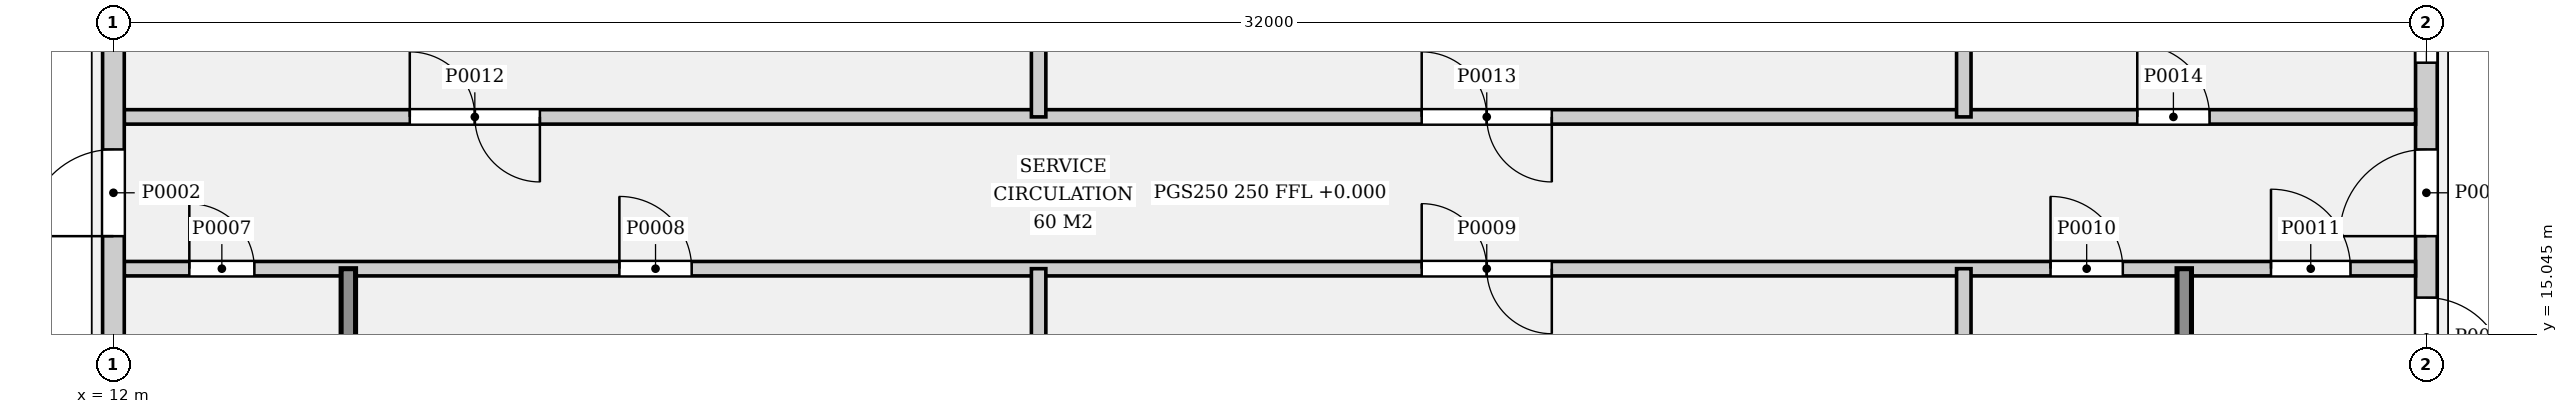
"""IFC4 building model, lengths in metres.
Left out: names, types, materials, properties, quantities, classifications, styles, units other than length and angle.
Written with IfcOpenShell. Run it as: python <this file> out.ifc"""

import sys

from ifc_helpers import new_model, si_unit, direction, frame, frame_2d, origin, place, context, subcontext, project, spatial, rectangle, extrude, element, fill, save


model = new_model("IFC4")
c1 = context("Model", 3, precision=1e-05, world=origin(), true_north=direction((0.0, 1.0)))
c2 = subcontext(c1, "Body", "Model", "MODEL_VIEW")
j1 = project(units=[si_unit("LENGTHUNIT", "METRE"), si_unit("PLANEANGLEUNIT", "RADIAN")], contexts=[c1])
p1 = place(None, origin())
s1 = spatial("IfcSite", under=j1, at=p1, CompositionType="ELEMENT")
p2 = place(p1, origin())
s2 = spatial("IfcBuilding", under=s1, at=p2, CompositionType="ELEMENT")
p3 = place(p2, origin())
s3 = spatial("IfcBuildingStorey", under=s2, at=p3, CompositionType="ELEMENT", Elevation=0.0)
p4 = place(p3, frame((12.0, 13.25, 0.0), z_axis=(0.0, 0.0, 1.0), x_axis=(0.0, 1.0, 0.0)))
e1 = element("IfcWall", 1, at=p4, inside=s3, PredefinedType="SOLIDWALL", context=c2, shape_type="SweptSolid", body=[
    extrude(rectangle(XDim=7.5, YDim=0.3, at=frame_2d((3.75, 0.0))), origin(), (0.0, 0.0, 1.0), 4.64),
])
p5 = place(p4, frame((3.15, 0.0, 0.0)))
e2 = element("IfcOpeningElement", 2, at=p5, cuts=e1, PredefinedType="OPENING", context=c2, shape_type="SweptSolid", body=[
    extrude(rectangle(XDim=1.2, YDim=2.1, at=frame_2d((0.6, 1.05))), frame((0.0, 0.16, 0.0), z_axis=(0.0, -1.0, 0.0), x_axis=(1.0, 0.0, 0.0)), (0.0, 0.0, 1.0), 0.32),
])
p6 = place(p3, frame((44.0, 13.25, 0.0), z_axis=(0.0, 0.0, 1.0), x_axis=(0.0, 1.0, 0.0)))
e3 = element("IfcWall", 3, at=p6, inside=s3, PredefinedType="SOLIDWALL", context=c2, shape_type="SweptSolid", body=[
    extrude(rectangle(XDim=7.5, YDim=0.3, at=frame_2d((3.75, 0.0))), origin(), (0.0, 0.0, 1.0), 4.64),
])
p7 = place(p6, frame((3.15, 0.0, 0.0)))
e4 = element("IfcOpeningElement", 4, at=p7, cuts=e3, PredefinedType="OPENING", context=c2, shape_type="SweptSolid", body=[
    extrude(rectangle(XDim=1.2, YDim=2.1, at=frame_2d((0.6, 1.05))), frame((0.0, 0.16, 0.0), z_axis=(0.0, -1.0, 0.0), x_axis=(1.0, 0.0, 0.0)), (0.0, 0.0, 1.0), 0.32),
])
p8 = place(p6, frame((2.3, 0.0, 0.0), z_axis=(0.0, 0.0, 1.0), x_axis=(-1.0, 0.0, 0.0)))
e5 = element("IfcOpeningElement", 5, at=p8, cuts=e3, PredefinedType="OPENING", context=c2, shape_type="SweptSolid", body=[
    extrude(rectangle(XDim=1.1, YDim=2.1, at=frame_2d((0.55, 1.05))), frame((0.0, 0.16, 0.0), z_axis=(0.0, -1.0, 0.0), x_axis=(1.0, 0.0, 0.0)), (0.0, 0.0, 1.0), 0.32),
])
p9 = place(p6, frame((5.55, 0.0, 0.9)))
e6 = element("IfcOpeningElement", 6, at=p9, cuts=e3, PredefinedType="OPENING", context=c2, shape_type="SweptSolid", body=[
    extrude(rectangle(XDim=1.2, YDim=2.4, at=frame_2d((0.6, 1.2))), frame((0.0, 0.16, 0.0), z_axis=(0.0, -1.0, 0.0), x_axis=(1.0, 0.0, 0.0)), (0.0, 0.0, 1.0), 0.32),
])
p10 = place(p3, frame((12.15, 15.95, 0.0), z_axis=(0.0, 0.0, 1.0), x_axis=(1.0, 0.0, 0.0)))
e7 = element("IfcWall", 7, at=p10, inside=s3, PredefinedType="PARTITIONING", context=c2, shape_type="SweptSolid", body=[
    extrude(rectangle(XDim=31.7, YDim=0.2, at=frame_2d((15.85, 0.0))), origin(), (0.0, 0.0, 1.0), 4.64),
])
p11 = place(p10, frame((0.9, 0.0, 0.0)))
e8 = element("IfcOpeningElement", 8, at=p11, cuts=e7, PredefinedType="OPENING", context=c2, shape_type="SweptSolid", body=[
    extrude(rectangle(XDim=0.9, YDim=2.1, at=frame_2d((0.45, 1.05))), frame((0.0, 0.11, 0.0), z_axis=(0.0, -1.0, 0.0), x_axis=(1.0, 0.0, 0.0)), (0.0, 0.0, 1.0), 0.22),
])
p12 = place(p10, frame((6.85, 0.0, 0.0)))
e9 = element("IfcOpeningElement", 9, at=p12, cuts=e7, PredefinedType="OPENING", context=c2, shape_type="SweptSolid", body=[
    extrude(rectangle(XDim=1.0, YDim=2.1, at=frame_2d((0.5, 1.05))), frame((0.0, 0.11, 0.0), z_axis=(0.0, -1.0, 0.0), x_axis=(1.0, 0.0, 0.0)), (0.0, 0.0, 1.0), 0.22),
])
p13 = place(p10, frame((17.95, 0.0, 0.0)))
e10 = element("IfcOpeningElement", 10, at=p13, cuts=e7, PredefinedType="OPENING", context=c2, shape_type="SweptSolid", body=[
    extrude(rectangle(XDim=1.8, YDim=2.4, at=frame_2d((0.9, 1.2))), frame((0.0, 0.11, 0.0), z_axis=(0.0, -1.0, 0.0), x_axis=(1.0, 0.0, 0.0)), (0.0, 0.0, 1.0), 0.22),
])
p14 = place(p10, frame((26.65, 0.0, 0.0)))
e11 = element("IfcOpeningElement", 11, at=p14, cuts=e7, PredefinedType="OPENING", context=c2, shape_type="SweptSolid", body=[
    extrude(rectangle(XDim=1.0, YDim=2.1, at=frame_2d((0.5, 1.05))), frame((0.0, 0.11, 0.0), z_axis=(0.0, -1.0, 0.0), x_axis=(1.0, 0.0, 0.0)), (0.0, 0.0, 1.0), 0.22),
])
p15 = place(p10, frame((29.7, 0.0, 0.0)))
e12 = element("IfcOpeningElement", 12, at=p15, cuts=e7, PredefinedType="OPENING", context=c2, shape_type="SweptSolid", body=[
    extrude(rectangle(XDim=1.1, YDim=2.1, at=frame_2d((0.55, 1.05))), frame((0.0, 0.11, 0.0), z_axis=(0.0, -1.0, 0.0), x_axis=(1.0, 0.0, 0.0)), (0.0, 0.0, 1.0), 0.22),
])
p16 = place(p3, frame((12.15, 18.05, 0.0), z_axis=(0.0, 0.0, 1.0), x_axis=(1.0, 0.0, 0.0)))
e13 = element("IfcWall", 13, at=p16, inside=s3, PredefinedType="PARTITIONING", context=c2, shape_type="SweptSolid", body=[
    extrude(rectangle(XDim=31.7, YDim=0.2, at=frame_2d((15.85, 0.0))), origin(), (0.0, 0.0, 1.0), 4.64),
])
p17 = place(p16, frame((3.95, 0.0, 0.0)))
e14 = element("IfcOpeningElement", 14, at=p17, cuts=e13, PredefinedType="OPENING", context=c2, shape_type="SweptSolid", body=[
    extrude(rectangle(XDim=1.8, YDim=2.4, at=frame_2d((0.9, 1.2))), frame((0.0, 0.11, 0.0), z_axis=(0.0, -1.0, 0.0), x_axis=(1.0, 0.0, 0.0)), (0.0, 0.0, 1.0), 0.22),
])
p18 = place(p16, frame((17.95, 0.0, 0.0)))
e15 = element("IfcOpeningElement", 15, at=p18, cuts=e13, PredefinedType="OPENING", context=c2, shape_type="SweptSolid", body=[
    extrude(rectangle(XDim=1.8, YDim=2.4, at=frame_2d((0.9, 1.2))), frame((0.0, 0.11, 0.0), z_axis=(0.0, -1.0, 0.0), x_axis=(1.0, 0.0, 0.0)), (0.0, 0.0, 1.0), 0.22),
])
p19 = place(p16, frame((27.85, 0.0, 0.0)))
e16 = element("IfcOpeningElement", 16, at=p19, cuts=e13, PredefinedType="OPENING", context=c2, shape_type="SweptSolid", body=[
    extrude(rectangle(XDim=1.0, YDim=2.1, at=frame_2d((0.5, 1.05))), frame((0.0, 0.11, 0.0), z_axis=(0.0, -1.0, 0.0), x_axis=(1.0, 0.0, 0.0)), (0.0, 0.0, 1.0), 0.22),
])
p20 = place(p3, frame((15.25, 5.15, 0.0), z_axis=(0.0, 0.0, 1.0), x_axis=(0.0, 1.0, 0.0)))
e17 = element("IfcWall", 17, at=p20, inside=s3, PredefinedType="SOLIDWALL", context=c2, shape_type="SweptSolid", body=[
    extrude(rectangle(XDim=10.8, YDim=0.2, at=frame_2d((5.4, 0.0))), origin(), (0.0, 0.0, 1.0), 4.64),
])
p21 = place(p20, frame((0.1, 0.0, 0.0)))
e18 = element("IfcOpeningElement", 18, at=p21, cuts=e17, PredefinedType="OPENING", context=c2, shape_type="SweptSolid", body=[
    extrude(rectangle(XDim=1.1, YDim=2.1, at=frame_2d((0.55, 1.05))), frame((0.0, 0.11, 0.0), z_axis=(0.0, -1.0, 0.0), x_axis=(1.0, 0.0, 0.0)), (0.0, 0.0, 1.0), 0.22),
])
for number, where, z_axis, x_axis in (
    (19, (24.8, 13.25, 0.0), (0.0, 0.0, 1.0), (0.0, 1.0, 0.0)),
    (20, (37.6, 13.25, 0.0), (0.0, 0.0, 1.0), (0.0, 1.0, 0.0)),
):
    element("IfcWall", number, at=place(p3, frame(where, z_axis=z_axis, x_axis=x_axis)), inside=s3, PredefinedType="PARTITIONING", context=c2, shape_type="SweptSolid", body=[
        extrude(rectangle(XDim=2.7, YDim=0.2, at=frame_2d((1.35, 0.0))), origin(), (0.0, 0.0, 1.0), 4.64),
    ])
p22 = place(p3, frame((40.65, 5.15, 0.0), z_axis=(0.0, 0.0, 1.0), x_axis=(0.0, 1.0, 0.0)))
e21 = element("IfcWall", 21, at=p22, inside=s3, PredefinedType="SOLIDWALL", context=c2, shape_type="SweptSolid", body=[
    extrude(rectangle(XDim=10.8, YDim=0.2, at=frame_2d((5.4, 0.0))), origin(), (0.0, 0.0, 1.0), 4.64),
])
p23 = place(p22, frame((1.7, 0.0, 0.0)))
e22 = element("IfcOpeningElement", 22, at=p23, cuts=e21, PredefinedType="OPENING", context=c2, shape_type="SweptSolid", body=[
    extrude(rectangle(XDim=0.9, YDim=2.1, at=frame_2d((0.45, 1.05))), frame((0.0, 0.11, 0.0), z_axis=(0.0, -1.0, 0.0), x_axis=(1.0, 0.0, 0.0)), (0.0, 0.0, 1.0), 0.22),
])
for number, where, z_axis, x_axis in (
    (23, (24.8, 18.05, 0.0), (0.0, 0.0, 1.0), (0.0, 1.0, 0.0)),
    (24, (37.6, 18.05, 0.0), (0.0, 0.0, 1.0), (0.0, 1.0, 0.0)),
):
    element("IfcWall", number, at=place(p3, frame(where, z_axis=z_axis, x_axis=x_axis)), inside=s3, PredefinedType="PARTITIONING", context=c2, shape_type="SweptSolid", body=[
        extrude(rectangle(XDim=2.7, YDim=0.2, at=frame_2d((1.35, 0.0))), origin(), (0.0, 0.0, 1.0), 4.64),
    ])
p24 = place(p5, origin())
e25 = element("IfcDoor", 25, at=p24, inside=s3, OperationType="SINGLE_SWING_LEFT", PredefinedType="DOOR", context=c2, shape_type="SweptSolid", body=[
    extrude(rectangle(XDim=1.2, YDim=2.1, at=frame_2d((0.6, 1.05))), frame((0.0, 0.025, 0.0), z_axis=(0.0, -1.0, 0.0), x_axis=(1.0, 0.0, 0.0)), (0.0, 0.0, 1.0), 0.05),
])
fill(e2, e25)
p25 = place(p7, origin())
e26 = element("IfcDoor", 26, at=p25, inside=s3, OperationType="SINGLE_SWING_LEFT", PredefinedType="DOOR", context=c2, shape_type="SweptSolid", body=[
    extrude(rectangle(XDim=1.2, YDim=2.1, at=frame_2d((0.6, 1.05))), frame((0.0, 0.025, 0.0), z_axis=(0.0, -1.0, 0.0), x_axis=(1.0, 0.0, 0.0)), (0.0, 0.0, 1.0), 0.05),
])
fill(e4, e26)
p26 = place(p8, origin())
e27 = element("IfcDoor", 27, at=p26, inside=s3, OperationType="SINGLE_SWING_LEFT", PredefinedType="DOOR", context=c2, shape_type="SweptSolid", body=[
    extrude(rectangle(XDim=1.1, YDim=2.1, at=frame_2d((0.55, 1.05))), frame((0.0, 0.025, 0.0), z_axis=(0.0, -1.0, 0.0), x_axis=(1.0, 0.0, 0.0)), (0.0, 0.0, 1.0), 0.05),
])
fill(e5, e27)
p27 = place(p9, origin())
e28 = element("IfcWindow", 28, at=p27, inside=s3, PartitioningType="SINGLE_PANEL", PredefinedType="USERDEFINED", context=c2, shape_type="SweptSolid", body=[
    extrude(rectangle(XDim=1.2, YDim=2.4, at=frame_2d((0.6, 1.2))), frame((0.0, 0.03, 0.0), z_axis=(0.0, -1.0, 0.0), x_axis=(1.0, 0.0, 0.0)), (0.0, 0.0, 1.0), 0.06),
])
fill(e6, e28)
p28 = place(p11, origin())
e29 = element("IfcDoor", 29, at=p28, inside=s3, OperationType="SINGLE_SWING_LEFT", PredefinedType="DOOR", context=c2, shape_type="SweptSolid", body=[
    extrude(rectangle(XDim=0.9, YDim=2.1, at=frame_2d((0.45, 1.05))), frame((0.0, 0.025, 0.0), z_axis=(0.0, -1.0, 0.0), x_axis=(1.0, 0.0, 0.0)), (0.0, 0.0, 1.0), 0.05),
])
fill(e8, e29)
p29 = place(p12, origin())
e30 = element("IfcDoor", 30, at=p29, inside=s3, OperationType="SINGLE_SWING_LEFT", PredefinedType="DOOR", context=c2, shape_type="SweptSolid", body=[
    extrude(rectangle(XDim=1.0, YDim=2.1, at=frame_2d((0.5, 1.05))), frame((0.0, 0.025, 0.0), z_axis=(0.0, -1.0, 0.0), x_axis=(1.0, 0.0, 0.0)), (0.0, 0.0, 1.0), 0.05),
])
fill(e9, e30)
p30 = place(p13, origin())
e31 = element("IfcDoor", 31, at=p30, inside=s3, OperationType="DOUBLE_DOOR_SINGLE_SWING", PredefinedType="DOOR", context=c2, shape_type="SweptSolid", body=[
    extrude(rectangle(XDim=1.8, YDim=2.4, at=frame_2d((0.9, 1.2))), frame((0.0, 0.025, 0.0), z_axis=(0.0, -1.0, 0.0), x_axis=(1.0, 0.0, 0.0)), (0.0, 0.0, 1.0), 0.05),
])
fill(e10, e31)
p31 = place(p14, origin())
e32 = element("IfcDoor", 32, at=p31, inside=s3, OperationType="SINGLE_SWING_LEFT", PredefinedType="DOOR", context=c2, shape_type="SweptSolid", body=[
    extrude(rectangle(XDim=1.0, YDim=2.1, at=frame_2d((0.5, 1.05))), frame((0.0, 0.025, 0.0), z_axis=(0.0, -1.0, 0.0), x_axis=(1.0, 0.0, 0.0)), (0.0, 0.0, 1.0), 0.05),
])
fill(e11, e32)
p32 = place(p15, origin())
e33 = element("IfcDoor", 33, at=p32, inside=s3, OperationType="SINGLE_SWING_LEFT", PredefinedType="DOOR", context=c2, shape_type="SweptSolid", body=[
    extrude(rectangle(XDim=1.1, YDim=2.1, at=frame_2d((0.55, 1.05))), frame((0.0, 0.025, 0.0), z_axis=(0.0, -1.0, 0.0), x_axis=(1.0, 0.0, 0.0)), (0.0, 0.0, 1.0), 0.05),
])
fill(e12, e33)
p33 = place(p17, origin())
e34 = element("IfcDoor", 34, at=p33, inside=s3, OperationType="DOUBLE_DOOR_SINGLE_SWING", PredefinedType="DOOR", context=c2, shape_type="SweptSolid", body=[
    extrude(rectangle(XDim=1.8, YDim=2.4, at=frame_2d((0.9, 1.2))), frame((0.0, 0.025, 0.0), z_axis=(0.0, -1.0, 0.0), x_axis=(1.0, 0.0, 0.0)), (0.0, 0.0, 1.0), 0.05),
])
fill(e14, e34)
p34 = place(p18, origin())
e35 = element("IfcDoor", 35, at=p34, inside=s3, OperationType="DOUBLE_DOOR_SINGLE_SWING", PredefinedType="DOOR", context=c2, shape_type="SweptSolid", body=[
    extrude(rectangle(XDim=1.8, YDim=2.4, at=frame_2d((0.9, 1.2))), frame((0.0, 0.025, 0.0), z_axis=(0.0, -1.0, 0.0), x_axis=(1.0, 0.0, 0.0)), (0.0, 0.0, 1.0), 0.05),
])
fill(e15, e35)
p35 = place(p19, origin())
e36 = element("IfcDoor", 36, at=p35, inside=s3, OperationType="SINGLE_SWING_LEFT", PredefinedType="DOOR", context=c2, shape_type="SweptSolid", body=[
    extrude(rectangle(XDim=1.0, YDim=2.1, at=frame_2d((0.5, 1.05))), frame((0.0, 0.025, 0.0), z_axis=(0.0, -1.0, 0.0), x_axis=(1.0, 0.0, 0.0)), (0.0, 0.0, 1.0), 0.05),
])
fill(e16, e36)
save(model, sys.argv[1])
